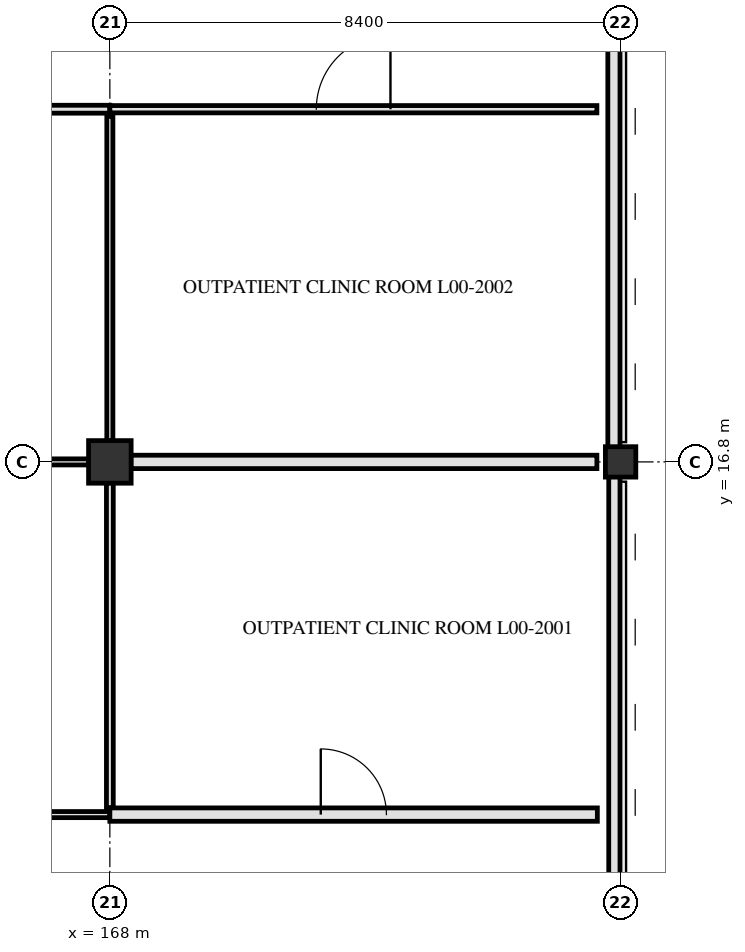
"""IFC4 building model, lengths in metres.
Left out: names, types, materials, properties, quantities, classifications, styles, units other than length and angle.
Written with IfcOpenShell. Run it as: python <this file> out.ifc"""

import sys

from ifc_helpers import new_model, si_unit, direction, frame, frame_2d, origin, origin_2d, place, context, subcontext, project, spatial, rectangle, extrude, element, fill, save


model = new_model("IFC4")
c1 = context("Model", 3, precision=1e-05, world=origin(), true_north=direction((0.0, 1.0)))
c2 = subcontext(c1, "Body", "Model", "MODEL_VIEW")
j1 = project(units=[si_unit("LENGTHUNIT", "METRE"), si_unit("PLANEANGLEUNIT", "RADIAN")], contexts=[c1])
p1 = place(None, origin())
s1 = spatial("IfcSite", under=j1, at=p1, CompositionType="ELEMENT")
p2 = place(p1, origin())
s2 = spatial("IfcBuilding", under=s1, at=p2, CompositionType="ELEMENT")
p3 = place(p2, origin())
s3 = spatial("IfcBuildingStorey", under=s2, at=p3, CompositionType="ELEMENT", Elevation=0.0)
p4 = place(p3, frame((168.0, 16.8, 0.0), z_axis=(0.0, 0.0, 1.0), x_axis=(1.0, 0.0, 0.0)))
e1 = element("IfcColumn", 1, at=p4, inside=s3, PredefinedType="COLUMN", context=c2, shape_type="SweptSolid", body=[
    extrude(rectangle(XDim=0.7, YDim=0.7, at=origin_2d()), origin(), (0.0, 0.0, 1.0), 4.8),
])
p5 = place(p3, frame((176.4, 16.8, 0.0), z_axis=(0.0, 0.0, 1.0), x_axis=(1.0, 0.0, 0.0)))
e2 = element("IfcColumn", 2, at=p5, inside=s3, PredefinedType="COLUMN", context=c2, shape_type="SweptSolid", body=[
    extrude(rectangle(XDim=0.5, YDim=0.5, at=origin_2d()), origin(), (0.0, 0.0, 1.0), 4.8),
])
p6 = place(p3, frame((176.29, 25.2, 4.78), z_axis=(0.0, 0.0, 1.0), x_axis=(0.0, -1.0, 0.0)))
e3 = element("IfcWall", 3, at=p6, inside=s3, PredefinedType="PARAPET", context=c2, shape_type="SweptSolid", body=[
    extrude(rectangle(XDim=8.4, YDim=0.2, at=frame_2d((4.2, 0.0))), origin(), (0.0, 0.0, 1.0), 1.17),
])
p7 = place(p3, frame((176.298, 16.8, 4.78), z_axis=(0.0, 0.0, 1.0), x_axis=(0.0, -1.0, 0.0)))
e4 = element("IfcWall", 4, at=p7, inside=s3, PredefinedType="PARAPET", context=c2, shape_type="SweptSolid", body=[
    extrude(rectangle(XDim=8.4, YDim=0.185, at=frame_2d((4.2, 0.0))), origin(), (0.0, 0.0, 1.0), 1.17),
])
p8 = place(p3, frame((159.6, 11.0, 0.0), z_axis=(0.0, 0.0, 1.0), x_axis=(1.0, 0.0, 0.0)))
e5 = element("IfcWall", 5, at=p8, inside=s3, PredefinedType="PARTITIONING", context=c2, shape_type="SweptSolid", body=[
    extrude(rectangle(XDim=8.4, YDim=0.1, at=frame_2d((4.2, 0.0))), origin(), (0.0, 0.0, 1.0), 3.89),
])
p9 = place(p8, frame((3.55, 0.0, 0.0)))
e6 = element("IfcOpeningElement", 6, at=p9, cuts=e5, PredefinedType="OPENING", context=c2, shape_type="SweptSolid", body=[
    extrude(rectangle(XDim=1.3, YDim=2.2, at=frame_2d((0.65, 1.1))), frame((0.0, 0.06, 0.0), z_axis=(0.0, -1.0, 0.0), x_axis=(1.0, 0.0, 0.0)), (0.0, 0.0, 1.0), 0.12),
])
p10 = place(p3, frame((168.0, 11.0, 0.0), z_axis=(0.0, 0.0, 1.0), x_axis=(1.0, 0.0, 0.0)))
e7 = element("IfcWall", 7, at=p10, inside=s3, PredefinedType="PARTITIONING", context=c2, shape_type="SweptSolid", body=[
    extrude(rectangle(XDim=8.018, YDim=0.22, at=frame_2d((4.009, 0.0))), origin(), (0.0, 0.0, 1.0), 3.89),
])
p11 = place(p10, frame((3.469, 0.0, 0.0)))
e8 = element("IfcOpeningElement", 8, at=p11, cuts=e7, PredefinedType="OPENING", context=c2, shape_type="SweptSolid", body=[
    extrude(rectangle(XDim=1.08, YDim=2.12, at=frame_2d((0.54, 1.06))), frame((0.0, 0.12, 0.0), z_axis=(0.0, -1.0, 0.0), x_axis=(1.0, 0.0, 0.0)), (0.0, 0.0, 1.0), 0.24),
])
p12 = place(p3, frame((159.945, 16.8, 0.0), z_axis=(0.0, 0.0, 1.0), x_axis=(1.0, 0.0, 0.0)))
e9 = element("IfcWall", 9, at=p12, inside=s3, PredefinedType="PARTITIONING", context=c2, shape_type="SweptSolid", body=[
    extrude(rectangle(XDim=7.71, YDim=0.1, at=frame_2d((3.855, 0.0))), origin(), (0.0, 0.0, 1.0), 3.84),
])
p13 = place(p3, frame((168.345, 16.8, 0.0), z_axis=(0.0, 0.0, 1.0), x_axis=(1.0, 0.0, 0.0)))
e10 = element("IfcWall", 10, at=p13, inside=s3, PredefinedType="PARTITIONING", context=c2, shape_type="SweptSolid", body=[
    extrude(rectangle(XDim=7.665, YDim=0.22, at=frame_2d((3.833, 0.0))), origin(), (0.0, 0.0, 1.0), 3.84),
])
p14 = place(p3, frame((159.6, 22.6, 0.0), z_axis=(0.0, 0.0, 1.0), x_axis=(1.0, 0.0, 0.0)))
e11 = element("IfcWall", 11, at=p14, inside=s3, PredefinedType="PARTITIONING", context=c2, shape_type="SweptSolid", body=[
    extrude(rectangle(XDim=8.4, YDim=0.13, at=frame_2d((4.2, 0.0))), origin(), (0.0, 0.0, 1.0), 3.89),
])
p15 = place(p14, frame((3.46, 0.0, 0.0)))
e12 = element("IfcOpeningElement", 12, at=p15, cuts=e11, PredefinedType="OPENING", context=c2, shape_type="SweptSolid", body=[
    extrude(rectangle(XDim=1.48, YDim=2.22, at=frame_2d((0.74, 1.11))), frame((0.0, 0.075, 0.0), z_axis=(0.0, -1.0, 0.0), x_axis=(1.0, 0.0, 0.0)), (0.0, 0.0, 1.0), 0.15),
])
p16 = place(p3, frame((168.0, 22.6, 0.0), z_axis=(0.0, 0.0, 1.0), x_axis=(1.0, 0.0, 0.0)))
e13 = element("IfcWall", 13, at=p16, inside=s3, PredefinedType="PARTITIONING", context=c2, shape_type="SweptSolid", body=[
    extrude(rectangle(XDim=8.01, YDim=0.12, at=frame_2d((4.005, 0.0))), origin(), (0.0, 0.0, 1.0), 3.89),
])
p17 = place(p16, frame((3.395, 0.0, 0.0)))
e14 = element("IfcOpeningElement", 14, at=p17, cuts=e13, PredefinedType="OPENING", context=c2, shape_type="SweptSolid", body=[
    extrude(rectangle(XDim=1.22, YDim=2.18, at=frame_2d((0.61, 1.09))), frame((0.0, 0.07, 0.0), z_axis=(0.0, -1.0, 0.0), x_axis=(1.0, 0.0, 0.0)), (0.0, 0.0, 1.0), 0.14),
])
p18 = place(p3, frame((168.0, 11.115, 0.0), z_axis=(0.0, 0.0, 1.0), x_axis=(0.0, 1.0, 0.0)))
e15 = element("IfcWall", 15, at=p18, inside=s3, PredefinedType="PARTITIONING", context=c2, shape_type="SweptSolid", body=[
    extrude(rectangle(XDim=5.34, YDim=0.112, at=frame_2d((2.67, 0.0))), origin(), (0.0, 0.0, 1.0), 3.89),
])
p19 = place(p3, frame((168.0, 17.145, 0.0), z_axis=(0.0, 0.0, 1.0), x_axis=(0.0, 1.0, 0.0)))
e16 = element("IfcWall", 16, at=p19, inside=s3, PredefinedType="PARTITIONING", context=c2, shape_type="SweptSolid", body=[
    extrude(rectangle(XDim=5.34, YDim=0.1, at=frame_2d((2.67, 0.0))), origin(), (0.0, 0.0, 1.0), 3.89),
])
p20 = place(p11, origin())
e17 = element("IfcDoor", 17, at=p20, inside=s3, OperationType="SINGLE_SWING_LEFT", PredefinedType="DOOR", context=c2, shape_type="SweptSolid", body=[
    extrude(rectangle(XDim=1.08, YDim=2.12, at=frame_2d((0.54, 1.06))), frame((0.0, 0.025, 0.0), z_axis=(0.0, -1.0, 0.0), x_axis=(1.0, 0.0, 0.0)), (0.0, 0.0, 1.0), 0.05),
])
fill(e8, e17)
p21 = place(p17, origin())
e18 = element("IfcDoor", 18, at=p21, inside=s3, OperationType="SINGLE_SWING_RIGHT", PredefinedType="DOOR", context=c2, shape_type="SweptSolid", body=[
    extrude(rectangle(XDim=1.22, YDim=2.18, at=frame_2d((0.61, 1.09))), frame((0.0, 0.025, 0.0), z_axis=(0.0, -1.0, 0.0), x_axis=(1.0, 0.0, 0.0)), (0.0, 0.0, 1.0), 0.05),
])
fill(e14, e18)
save(model, sys.argv[1])
